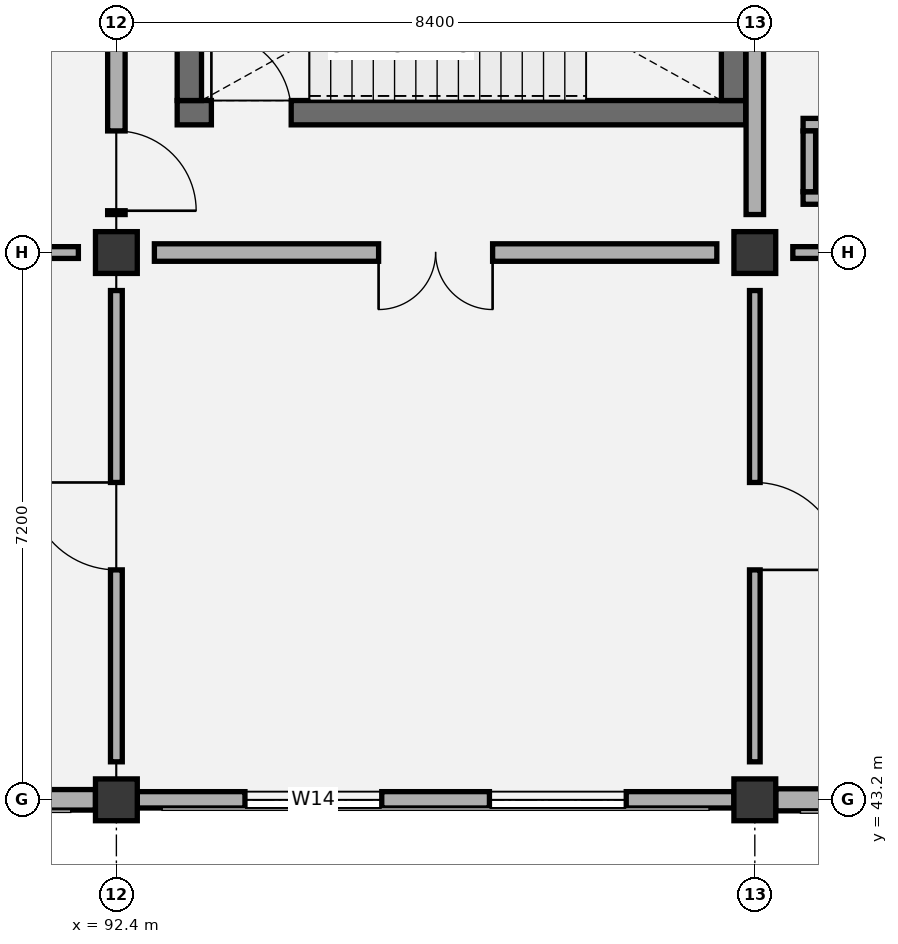
"""IFC4 building model, lengths in metres.
Left out: names, types, materials, properties, quantities, classifications, styles, units other than length and angle.
Written with IfcOpenShell. Run it as: python <this file> out.ifc"""

import sys

from ifc_helpers import new_model, si_unit, direction, frame, frame_2d, origin, origin_2d, place, context, subcontext, project, spatial, rectangle, extrude, element, fill, save


model = new_model("IFC4")
c1 = context("Model", 3, precision=1e-05, world=origin(), true_north=direction((0.0, 1.0)))
c2 = subcontext(c1, "Body", "Model", "MODEL_VIEW")
j1 = project(units=[si_unit("LENGTHUNIT", "METRE"), si_unit("PLANEANGLEUNIT", "RADIAN")], contexts=[c1])
p1 = place(None, origin())
s1 = spatial("IfcSite", under=j1, at=p1, CompositionType="ELEMENT")
p2 = place(p1, origin())
s2 = spatial("IfcBuilding", under=s1, at=p2, CompositionType="ELEMENT")
p3 = place(p2, frame((0.0, 0.0, 60.6)))
s3 = spatial("IfcBuildingStorey", under=s2, at=p3, CompositionType="ELEMENT", Elevation=60.6)
for number, where, z_axis, x_axis in (
    (1, (92.4, 43.2, 0.0), (0.0, 0.0, 1.0), (1.0, 0.0, 0.0)),
    (2, (92.4, 50.4, 0.0), (0.0, 0.0, 1.0), (1.0, 0.0, 0.0)),
    (3, (100.8, 43.2, 0.0), (0.0, 0.0, 1.0), (1.0, 0.0, 0.0)),
    (4, (100.8, 50.4, 0.0), (0.0, 0.0, 1.0), (1.0, 0.0, 0.0)),
):
    element("IfcColumn", number, at=place(p3, frame(where, z_axis=z_axis, x_axis=x_axis)), inside=s3, PredefinedType="COLUMN", context=c2, shape_type="SweptSolid", body=[
        extrude(rectangle(XDim=0.55, YDim=0.55, at=origin_2d()), origin(), (0.0, 0.0, 1.0), 4.2),
    ])
p4 = place(p3, frame((93.2, 52.24, 0.0), z_axis=(0.0, 0.0, 1.0), x_axis=(1.0, 0.0, 0.0)))
e5 = element("IfcWall", 5, at=p4, inside=s3, PredefinedType="SHEAR", context=c2, shape_type="SweptSolid", body=[
    extrude(rectangle(XDim=7.48, YDim=0.32, at=frame_2d((3.74, 0.0))), origin(), (0.0, 0.0, 1.0), 3.95),
])
p5 = place(p4, frame((0.45, 0.0, 0.0)))
e6 = element("IfcOpeningElement", 6, at=p5, cuts=e5, PredefinedType="OPENING", context=c2, shape_type="SweptSolid", body=[
    extrude(rectangle(XDim=1.05, YDim=2.15, at=frame_2d((0.525, 1.075))), frame((0.0, 0.17, 0.0), z_axis=(0.0, -1.0, 0.0), x_axis=(1.0, 0.0, 0.0)), (0.0, 0.0, 1.0), 0.34),
])
for number, where, z_axis, x_axis in (
    (7, (93.36, 52.4, 0.0), (0.0, 0.0, 1.0), (0.0, 1.0, 0.0)),
    (8, (100.52, 52.4, 0.0), (0.0, 0.0, 1.0), (0.0, 1.0, 0.0)),
):
    element("IfcWall", number, at=place(p3, frame(where, z_axis=z_axis, x_axis=x_axis)), inside=s3, PredefinedType="SHEAR", context=c2, shape_type="SweptSolid", body=[
        extrude(rectangle(XDim=3.8, YDim=0.32, at=frame_2d((1.9, 0.0))), origin(), (0.0, 0.0, 1.0), 3.95),
    ])
p6 = place(p3, frame((84.275, 43.2, 0.0), z_axis=(0.0, 0.0, 1.0), x_axis=(1.0, 0.0, 0.0)))
e9 = element("IfcWall", 9, at=p6, inside=s3, PredefinedType="SOLIDWALL", context=c2, shape_type="SweptSolid", body=[
    extrude(rectangle(XDim=7.85, YDim=0.27, at=frame_2d((3.925, 0.0))), origin(), (0.0, 0.0, 1.0), 3.395),
])
p7 = place(p6, frame((1.717, 0.0, 0.95)))
e10 = element("IfcOpeningElement", 10, at=p7, cuts=e9, PredefinedType="OPENING", context=c2, shape_type="SweptSolid", body=[
    extrude(rectangle(XDim=1.35, YDim=1.65, at=frame_2d((0.675, 0.825))), frame((0.0, 0.145, 0.0), z_axis=(0.0, -1.0, 0.0), x_axis=(1.0, 0.0, 0.0)), (0.0, 0.0, 1.0), 0.29),
])
p8 = place(p6, frame((4.783, 0.0, 0.95)))
e11 = element("IfcOpeningElement", 11, at=p8, cuts=e9, PredefinedType="OPENING", context=c2, shape_type="SweptSolid", body=[
    extrude(rectangle(XDim=1.35, YDim=1.65, at=frame_2d((0.675, 0.825))), frame((0.0, 0.145, 0.0), z_axis=(0.0, -1.0, 0.0), x_axis=(1.0, 0.0, 0.0)), (0.0, 0.0, 1.0), 0.29),
])
p9 = place(p3, frame((92.675, 43.2, 0.0), z_axis=(0.0, 0.0, 1.0), x_axis=(1.0, 0.0, 0.0)))
e12 = element("IfcWall", 12, at=p9, inside=s3, PredefinedType="SOLIDWALL", context=c2, shape_type="SweptSolid", body=[
    extrude(rectangle(XDim=7.85, YDim=0.215, at=frame_2d((3.925, 0.0))), origin(), (0.0, 0.0, 1.0), 3.395),
])
p10 = place(p9, frame((1.417, 0.0, 0.95)))
e13 = element("IfcOpeningElement", 13, at=p10, cuts=e12, PredefinedType="OPENING", context=c2, shape_type="SweptSolid", body=[
    extrude(rectangle(XDim=1.8, YDim=1.5, at=frame_2d((0.9, 0.75))), frame((0.0, 0.117, 0.0), z_axis=(0.0, -1.0, 0.0), x_axis=(1.0, 0.0, 0.0)), (0.0, 0.0, 1.0), 0.235),
])
p11 = place(p9, frame((4.633, 0.0, 0.95)))
e14 = element("IfcOpeningElement", 14, at=p11, cuts=e12, PredefinedType="OPENING", context=c2, shape_type="SweptSolid", body=[
    extrude(rectangle(XDim=1.8, YDim=1.5, at=frame_2d((0.9, 0.75))), frame((0.0, 0.117, 0.0), z_axis=(0.0, -1.0, 0.0), x_axis=(1.0, 0.0, 0.0)), (0.0, 0.0, 1.0), 0.235),
])
p12 = place(p3, frame((101.075, 43.2, 0.0), z_axis=(0.0, 0.0, 1.0), x_axis=(1.0, 0.0, 0.0)))
e15 = element("IfcWall", 15, at=p12, inside=s3, PredefinedType="SOLIDWALL", context=c2, shape_type="SweptSolid", body=[
    extrude(rectangle(XDim=7.85, YDim=0.29, at=frame_2d((3.925, 0.0))), origin(), (0.0, 0.0, 1.0), 3.395),
])
p13 = place(p12, frame((1.517, 0.0, 0.95)))
e16 = element("IfcOpeningElement", 16, at=p13, cuts=e15, PredefinedType="OPENING", context=c2, shape_type="SweptSolid", body=[
    extrude(rectangle(XDim=1.65, YDim=1.65, at=frame_2d((0.825, 0.825))), frame((0.0, 0.155, 0.0), z_axis=(0.0, -1.0, 0.0), x_axis=(1.0, 0.0, 0.0)), (0.0, 0.0, 1.0), 0.31),
])
p14 = place(p12, frame((4.683, 0.0, 0.95)))
e17 = element("IfcOpeningElement", 17, at=p14, cuts=e15, PredefinedType="OPENING", context=c2, shape_type="SweptSolid", body=[
    extrude(rectangle(XDim=1.65, YDim=1.65, at=frame_2d((0.825, 0.825))), frame((0.0, 0.155, 0.0), z_axis=(0.0, -1.0, 0.0), x_axis=(1.0, 0.0, 0.0)), (0.0, 0.0, 1.0), 0.31),
])
for number, where, z_axis, x_axis in (
    (18, (101.435, 51.117, 0.0), (0.0, 0.0, 1.0), (1.0, 0.0, 0.0)),
    (19, (101.435, 52.083, 0.0), (0.0, 0.0, 1.0), (1.0, 0.0, 0.0)),
):
    element("IfcWall", number, at=place(p3, frame(where, z_axis=z_axis, x_axis=x_axis)), inside=s3, PredefinedType="PARTITIONING", context=c2, shape_type="SweptSolid", body=[
        extrude(rectangle(XDim=1.43, YDim=0.165, at=frame_2d((0.715, 0.0))), origin(), (0.0, 0.0, 1.0), 3.95),
    ])
p15 = place(p3, frame((101.518, 51.2, 0.0), z_axis=(0.0, 0.0, 1.0), x_axis=(0.0, 1.0, 0.0)))
e20 = element("IfcWall", 20, at=p15, inside=s3, PredefinedType="PARTITIONING", context=c2, shape_type="SweptSolid", body=[
    extrude(rectangle(XDim=0.8, YDim=0.165, at=frame_2d((0.4, 0.0))), origin(), (0.0, 0.0, 1.0), 3.95),
])
p16 = place(p3, frame((92.4, 43.7, 0.0), z_axis=(0.0, 0.0, 1.0), x_axis=(0.0, 1.0, 0.0)))
e21 = element("IfcWall", 21, at=p16, inside=s3, PredefinedType="PARTITIONING", context=c2, shape_type="SweptSolid", body=[
    extrude(rectangle(XDim=6.2, YDim=0.155, at=frame_2d((3.1, 0.0))), origin(), (0.0, 0.0, 1.0), 3.545),
])
p17 = place(p16, frame((2.525, 0.0, 0.0)))
e22 = element("IfcOpeningElement", 22, at=p17, cuts=e21, PredefinedType="OPENING", context=c2, shape_type="SweptSolid", body=[
    extrude(rectangle(XDim=1.15, YDim=2.1, at=frame_2d((0.575, 1.05))), frame((0.0, 0.087, 0.0), z_axis=(0.0, -1.0, 0.0), x_axis=(1.0, 0.0, 0.0)), (0.0, 0.0, 1.0), 0.175),
])
p18 = place(p3, frame((84.5, 50.4, 0.0), z_axis=(0.0, 0.0, 1.0), x_axis=(1.0, 0.0, 0.0)))
e23 = element("IfcWall", 23, at=p18, inside=s3, PredefinedType="PARTITIONING", context=c2, shape_type="SweptSolid", body=[
    extrude(rectangle(XDim=7.4, YDim=0.155, at=frame_2d((3.7, 0.0))), origin(), (0.0, 0.0, 1.0), 3.595),
])
p19 = place(p18, frame((3.15, 0.0, 0.0)))
e24 = element("IfcOpeningElement", 24, at=p19, cuts=e23, PredefinedType="OPENING", context=c2, shape_type="SweptSolid", body=[
    extrude(rectangle(XDim=1.1, YDim=2.1, at=frame_2d((0.55, 1.05))), frame((0.0, 0.087, 0.0), z_axis=(0.0, -1.0, 0.0), x_axis=(1.0, 0.0, 0.0)), (0.0, 0.0, 1.0), 0.175),
])
p20 = place(p3, frame((92.4, 50.9, 0.0), z_axis=(0.0, 0.0, 1.0), x_axis=(0.0, 1.0, 0.0)))
e25 = element("IfcWall", 25, at=p20, inside=s3, PredefinedType="PARTITIONING", context=c2, shape_type="SweptSolid", body=[
    extrude(rectangle(XDim=6.2, YDim=0.23, at=frame_2d((3.1, 0.0))), origin(), (0.0, 0.0, 1.0), 3.445),
])
p21 = place(p20, frame((0.05, 0.0, 0.0)))
e26 = element("IfcOpeningElement", 26, at=p21, cuts=e25, PredefinedType="OPENING", context=c2, shape_type="SweptSolid", body=[
    extrude(rectangle(XDim=1.05, YDim=2.15, at=frame_2d((0.525, 1.075))), frame((0.0, 0.125, 0.0), z_axis=(0.0, -1.0, 0.0), x_axis=(1.0, 0.0, 0.0)), (0.0, 0.0, 1.0), 0.25),
])
p22 = place(p3, frame((100.8, 43.7, 0.0), z_axis=(0.0, 0.0, 1.0), x_axis=(0.0, 1.0, 0.0)))
e27 = element("IfcWall", 27, at=p22, inside=s3, PredefinedType="PARTITIONING", context=c2, shape_type="SweptSolid", body=[
    extrude(rectangle(XDim=6.2, YDim=0.14, at=frame_2d((3.1, 0.0))), origin(), (0.0, 0.0, 1.0), 3.445),
])
p23 = place(p22, frame((2.525, 0.0, 0.0)))
e28 = element("IfcOpeningElement", 28, at=p23, cuts=e27, PredefinedType="OPENING", context=c2, shape_type="SweptSolid", body=[
    extrude(rectangle(XDim=1.15, YDim=2.1, at=frame_2d((0.575, 1.05))), frame((0.0, 0.08, 0.0), z_axis=(0.0, -1.0, 0.0), x_axis=(1.0, 0.0, 0.0)), (0.0, 0.0, 1.0), 0.16),
])
p24 = place(p3, frame((92.9, 50.4, 0.0), z_axis=(0.0, 0.0, 1.0), x_axis=(1.0, 0.0, 0.0)))
e29 = element("IfcWall", 29, at=p24, inside=s3, PredefinedType="PARTITIONING", context=c2, shape_type="SweptSolid", body=[
    extrude(rectangle(XDim=7.4, YDim=0.23, at=frame_2d((3.7, 0.0))), origin(), (0.0, 0.0, 1.0), 3.655),
])
p25 = place(p24, frame((2.95, 0.0, 0.0)))
e30 = element("IfcOpeningElement", 30, at=p25, cuts=e29, PredefinedType="OPENING", context=c2, shape_type="SweptSolid", body=[
    extrude(rectangle(XDim=1.5, YDim=2.15, at=frame_2d((0.75, 1.075))), frame((0.0, 0.125, 0.0), z_axis=(0.0, -1.0, 0.0), x_axis=(1.0, 0.0, 0.0)), (0.0, 0.0, 1.0), 0.25),
])
p26 = place(p3, frame((100.8, 50.9, 0.0), z_axis=(0.0, 0.0, 1.0), x_axis=(0.0, 1.0, 0.0)))
e31 = element("IfcWall", 31, at=p26, inside=s3, PredefinedType="PARTITIONING", context=c2, shape_type="SweptSolid", body=[
    extrude(rectangle(XDim=6.2, YDim=0.23, at=frame_2d((3.1, 0.0))), origin(), (0.0, 0.0, 1.0), 3.655),
])
p27 = place(p3, frame((101.3, 50.4, 0.0), z_axis=(0.0, 0.0, 1.0), x_axis=(1.0, 0.0, 0.0)))
e32 = element("IfcWall", 32, at=p27, inside=s3, PredefinedType="PARTITIONING", context=c2, shape_type="SweptSolid", body=[
    extrude(rectangle(XDim=7.4, YDim=0.155, at=frame_2d((3.7, 0.0))), origin(), (0.0, 0.0, 1.0), 3.675),
])
p28 = place(p27, frame((3.15, 0.0, 0.0)))
e33 = element("IfcOpeningElement", 33, at=p28, cuts=e32, PredefinedType="OPENING", context=c2, shape_type="SweptSolid", body=[
    extrude(rectangle(XDim=1.1, YDim=2.1, at=frame_2d((0.55, 1.05))), frame((0.0, 0.087, 0.0), z_axis=(0.0, -1.0, 0.0), x_axis=(1.0, 0.0, 0.0)), (0.0, 0.0, 1.0), 0.175),
])
p29 = place(p10, origin())
e34 = element("IfcWindow", 34, at=p29, inside=s3, PartitioningType="SINGLE_PANEL", PredefinedType="WINDOW", context=c2, shape_type="SweptSolid", body=[
    extrude(rectangle(XDim=1.8, YDim=1.5, at=frame_2d((0.9, 0.75))), frame((0.0, 0.03, 0.0), z_axis=(0.0, -1.0, 0.0), x_axis=(1.0, 0.0, 0.0)), (0.0, 0.0, 1.0), 0.06),
])
fill(e13, e34)
p30 = place(p11, origin())
e35 = element("IfcWindow", 35, at=p30, inside=s3, PartitioningType="SINGLE_PANEL", PredefinedType="WINDOW", context=c2, shape_type="SweptSolid", body=[
    extrude(rectangle(XDim=1.8, YDim=1.5, at=frame_2d((0.9, 0.75))), frame((0.0, 0.03, 0.0), z_axis=(0.0, -1.0, 0.0), x_axis=(1.0, 0.0, 0.0)), (0.0, 0.0, 1.0), 0.06),
])
fill(e14, e35)
p31 = place(p5, origin())
e36 = element("IfcDoor", 36, at=p31, inside=s3, OperationType="SINGLE_SWING_LEFT", PredefinedType="DOOR", context=c2, shape_type="SweptSolid", body=[
    extrude(rectangle(XDim=1.05, YDim=2.15, at=frame_2d((0.525, 1.075))), frame((0.0, 0.025, 0.0), z_axis=(0.0, -1.0, 0.0), x_axis=(1.0, 0.0, 0.0)), (0.0, 0.0, 1.0), 0.05),
])
fill(e6, e36)
p32 = place(p17, origin())
e37 = element("IfcDoor", 37, at=p32, inside=s3, OperationType="SINGLE_SWING_RIGHT", PredefinedType="DOOR", context=c2, shape_type="SweptSolid", body=[
    extrude(rectangle(XDim=1.15, YDim=2.1, at=frame_2d((0.575, 1.05))), frame((0.0, 0.025, 0.0), z_axis=(0.0, -1.0, 0.0), x_axis=(1.0, 0.0, 0.0)), (0.0, 0.0, 1.0), 0.05),
])
fill(e22, e37)
p33 = place(p21, frame((1.05, 0.0, 0.0), z_axis=(0.0, 0.0, 1.0), x_axis=(-1.0, 0.0, 0.0)))
e38 = element("IfcDoor", 38, at=p33, inside=s3, OperationType="SINGLE_SWING_RIGHT", PredefinedType="DOOR", context=c2, shape_type="SweptSolid", body=[
    extrude(rectangle(XDim=1.05, YDim=2.15, at=frame_2d((0.525, 1.075))), frame((0.0, 0.025, 0.0), z_axis=(0.0, -1.0, 0.0), x_axis=(1.0, 0.0, 0.0)), (0.0, 0.0, 1.0), 0.05),
])
fill(e26, e38)
p34 = place(p23, frame((1.15, 0.0, 0.0), z_axis=(0.0, 0.0, 1.0), x_axis=(-1.0, 0.0, 0.0)))
e39 = element("IfcDoor", 39, at=p34, inside=s3, OperationType="SINGLE_SWING_RIGHT", PredefinedType="DOOR", context=c2, shape_type="SweptSolid", body=[
    extrude(rectangle(XDim=1.15, YDim=2.1, at=frame_2d((0.575, 1.05))), frame((0.0, 0.025, 0.0), z_axis=(0.0, -1.0, 0.0), x_axis=(1.0, 0.0, 0.0)), (0.0, 0.0, 1.0), 0.05),
])
fill(e28, e39)
p35 = place(p25, frame((1.5, 0.0, 0.0), z_axis=(0.0, 0.0, 1.0), x_axis=(-1.0, 0.0, 0.0)))
e40 = element("IfcDoor", 40, at=p35, inside=s3, OperationType="DOUBLE_DOOR_SINGLE_SWING", PredefinedType="DOOR", context=c2, shape_type="SweptSolid", body=[
    extrude(rectangle(XDim=1.5, YDim=2.15, at=frame_2d((0.75, 1.075))), frame((0.0, 0.025, 0.0), z_axis=(0.0, -1.0, 0.0), x_axis=(1.0, 0.0, 0.0)), (0.0, 0.0, 1.0), 0.05),
])
fill(e30, e40)
save(model, sys.argv[1])
